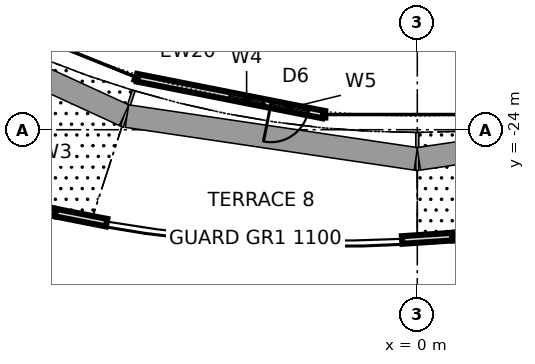
"""IFC4 building model, lengths in metres.
Left out: names, types, materials, properties, quantities, classifications, styles, units other than length and angle.
Written with IfcOpenShell. Run it as: python <this file> out.ifc"""

import sys

from ifc_helpers import new_model, si_unit, direction, frame, frame_2d, origin, place, context, subcontext, project, spatial, rectangle, extrude, element, fill, save


model = new_model("IFC4")
c1 = context("Model", 3, precision=1e-05, world=origin(), true_north=direction((0.0, 1.0)))
c2 = subcontext(c1, "Body", "Model", "MODEL_VIEW")
j1 = project(units=[si_unit("LENGTHUNIT", "METRE"), si_unit("PLANEANGLEUNIT", "RADIAN")], contexts=[c1])
p1 = place(None, origin())
s1 = spatial("IfcSite", under=j1, at=p1, CompositionType="ELEMENT")
p2 = place(p1, origin())
s2 = spatial("IfcBuilding", under=s1, at=p2, CompositionType="ELEMENT")
p3 = place(p2, frame((0.0, 0.0, 19.6)))
s3 = spatial("IfcBuildingStorey", under=s2, at=p3, CompositionType="ELEMENT", Elevation=19.6)
p4 = place(p3, frame((-7.355, -22.636, 0.0), z_axis=(0.0, 0.0, 1.0), x_axis=(0.981014785503, -0.193932953941, 0.0)))
e1 = element("IfcWall", 1, at=p4, inside=s3, PredefinedType="SOLIDWALL", context=c2, shape_type="SweptSolid", body=[
    extrude(rectangle(XDim=4.969, YDim=0.2, at=frame_2d((2.484, 0.0))), origin(), (0.0, 0.0, 1.0), 4.04),
])
p5 = place(p4, frame((3.569, 0.0, 0.0)))
e2 = element("IfcOpeningElement", 2, at=p5, cuts=e1, PredefinedType="OPENING", context=c2, shape_type="SweptSolid", body=[
    extrude(rectangle(XDim=1.0, YDim=2.4, at=frame_2d((0.5, 1.2))), frame((0.0, 0.11, 0.0), z_axis=(0.0, -1.0, 0.0), x_axis=(1.0, 0.0, 0.0)), (0.0, 0.0, 1.0), 0.22),
])
p6 = place(p4, frame((2.469, 0.0, 0.3)))
e3 = element("IfcOpeningElement", 3, at=p6, cuts=e1, PredefinedType="OPENING", context=c2, shape_type="SweptSolid", body=[
    extrude(rectangle(XDim=0.9, YDim=2.1, at=frame_2d((0.45, 1.05))), frame((0.0, 0.11, 0.0), z_axis=(0.0, -1.0, 0.0), x_axis=(1.0, 0.0, 0.0)), (0.0, 0.0, 1.0), 0.22),
])
p7 = place(p4, frame((3.569, 0.0, 2.7)))
e4 = element("IfcOpeningElement", 4, at=p7, cuts=e1, PredefinedType="OPENING", context=c2, shape_type="SweptSolid", body=[
    extrude(rectangle(XDim=1.0, YDim=0.6, at=frame_2d((0.5, 0.3))), frame((0.0, 0.11, 0.0), z_axis=(0.0, -1.0, 0.0), x_axis=(1.0, 0.0, 0.0)), (0.0, 0.0, 1.0), 0.22),
])
p8 = place(p3, frame((-10.858, -25.856, 0.0), z_axis=(0.0, 0.0, 1.0), x_axis=(0.97179603017, -0.235822975439, 0.0)))
e5 = element("IfcWall", 5, at=p8, inside=s3, PredefinedType="PARAPET", context=c2, shape_type="SweptSolid", body=[
    extrude(rectangle(XDim=1.379, YDim=0.2, at=frame_2d((0.689, 0.0))), origin(), (0.0, 0.0, 1.0), 1.1),
])
p9 = place(p3, frame((-9.518, -26.181, 0.0), z_axis=(0.0, 0.0, 1.0), x_axis=(0.981105215977, -0.193474947171, 0.0)))
e6 = element("IfcWall", 6, at=p9, inside=s3, PredefinedType="PARAPET", context=c2, shape_type="SweptSolid", body=[
    extrude(rectangle(XDim=1.369, YDim=0.2, at=frame_2d((0.685, 0.0))), origin(), (0.0, 0.0, 1.0), 1.1),
])
p10 = place(p3, frame((-0.399, -26.902, 0.0), z_axis=(0.0, 0.0, 1.0), x_axis=(0.997774520525, 0.066678378732, 0.0)))
e7 = element("IfcWall", 7, at=p10, inside=s3, PredefinedType="PARAPET", context=c2, shape_type="SweptSolid", body=[
    extrude(rectangle(XDim=1.322, YDim=0.2, at=frame_2d((0.661, 0.0))), origin(), (0.0, 0.0, 1.0), 1.1),
])
p11 = place(p3, frame((0.92, -26.814, 0.0), z_axis=(0.0, 0.0, 1.0), x_axis=(0.994998583121, 0.099889036376, 0.0)))
e8 = element("IfcWall", 8, at=p11, inside=s3, PredefinedType="PARAPET", context=c2, shape_type="SweptSolid", body=[
    extrude(rectangle(XDim=1.317, YDim=0.2, at=frame_2d((0.659, 0.0))), origin(), (0.0, 0.0, 1.0), 1.1),
])
p12 = place(p3, frame((2.472, -23.521, 0.0), z_axis=(0.0, 0.0, 1.0), x_axis=(-0.104529730385, 0.994521762188, 0.0)))
e9 = element("IfcWall", 9, at=p12, inside=s3, PredefinedType="PARTITIONING", context=c2, shape_type="SweptSolid", body=[
    extrude(rectangle(XDim=14.098, YDim=0.12, at=frame_2d((7.049, 0.0))), origin(), (0.0, 0.0, 1.0), 4.04),
])
p13 = place(p12, frame((6.524, 0.0, 0.0)))
e10 = element("IfcOpeningElement", 10, at=p13, cuts=e9, PredefinedType="OPENING", context=c2, shape_type="SweptSolid", body=[
    extrude(rectangle(XDim=1.0, YDim=2.4, at=frame_2d((0.5, 1.2))), frame((0.0, 0.07, 0.0), z_axis=(0.0, -1.0, 0.0), x_axis=(1.0, 0.0, 0.0)), (0.0, 0.0, 1.0), 0.14),
])
p14 = place(p5, frame((1.0, 0.0, 0.0), z_axis=(0.0, 0.0, 1.0), x_axis=(-1.0, 0.0, 0.0)))
e11 = element("IfcDoor", 11, at=p14, inside=s3, OperationType="SINGLE_SWING_RIGHT", PredefinedType="DOOR", context=c2, shape_type="SweptSolid", body=[
    extrude(rectangle(XDim=1.0, YDim=2.4, at=frame_2d((0.5, 1.2))), frame((0.0, 0.025, 0.0), z_axis=(0.0, -1.0, 0.0), x_axis=(1.0, 0.0, 0.0)), (0.0, 0.0, 1.0), 0.05),
])
fill(e2, e11)
p15 = place(p6, origin())
e12 = element("IfcWindow", 12, at=p15, inside=s3, PartitioningType="SINGLE_PANEL", PredefinedType="WINDOW", context=c2, shape_type="SweptSolid", body=[
    extrude(rectangle(XDim=0.9, YDim=2.1, at=frame_2d((0.45, 1.05))), frame((0.0, 0.03, 0.0), z_axis=(0.0, -1.0, 0.0), x_axis=(1.0, 0.0, 0.0)), (0.0, 0.0, 1.0), 0.06),
])
fill(e3, e12)
p16 = place(p7, origin())
e13 = element("IfcWindow", 13, at=p16, inside=s3, PartitioningType="SINGLE_PANEL", PredefinedType="WINDOW", context=c2, shape_type="SweptSolid", body=[
    extrude(rectangle(XDim=1.0, YDim=0.6, at=frame_2d((0.5, 0.3))), frame((0.0, 0.03, 0.0), z_axis=(0.0, -1.0, 0.0), x_axis=(1.0, 0.0, 0.0)), (0.0, 0.0, 1.0), 0.06),
])
fill(e4, e13)
save(model, sys.argv[1])
